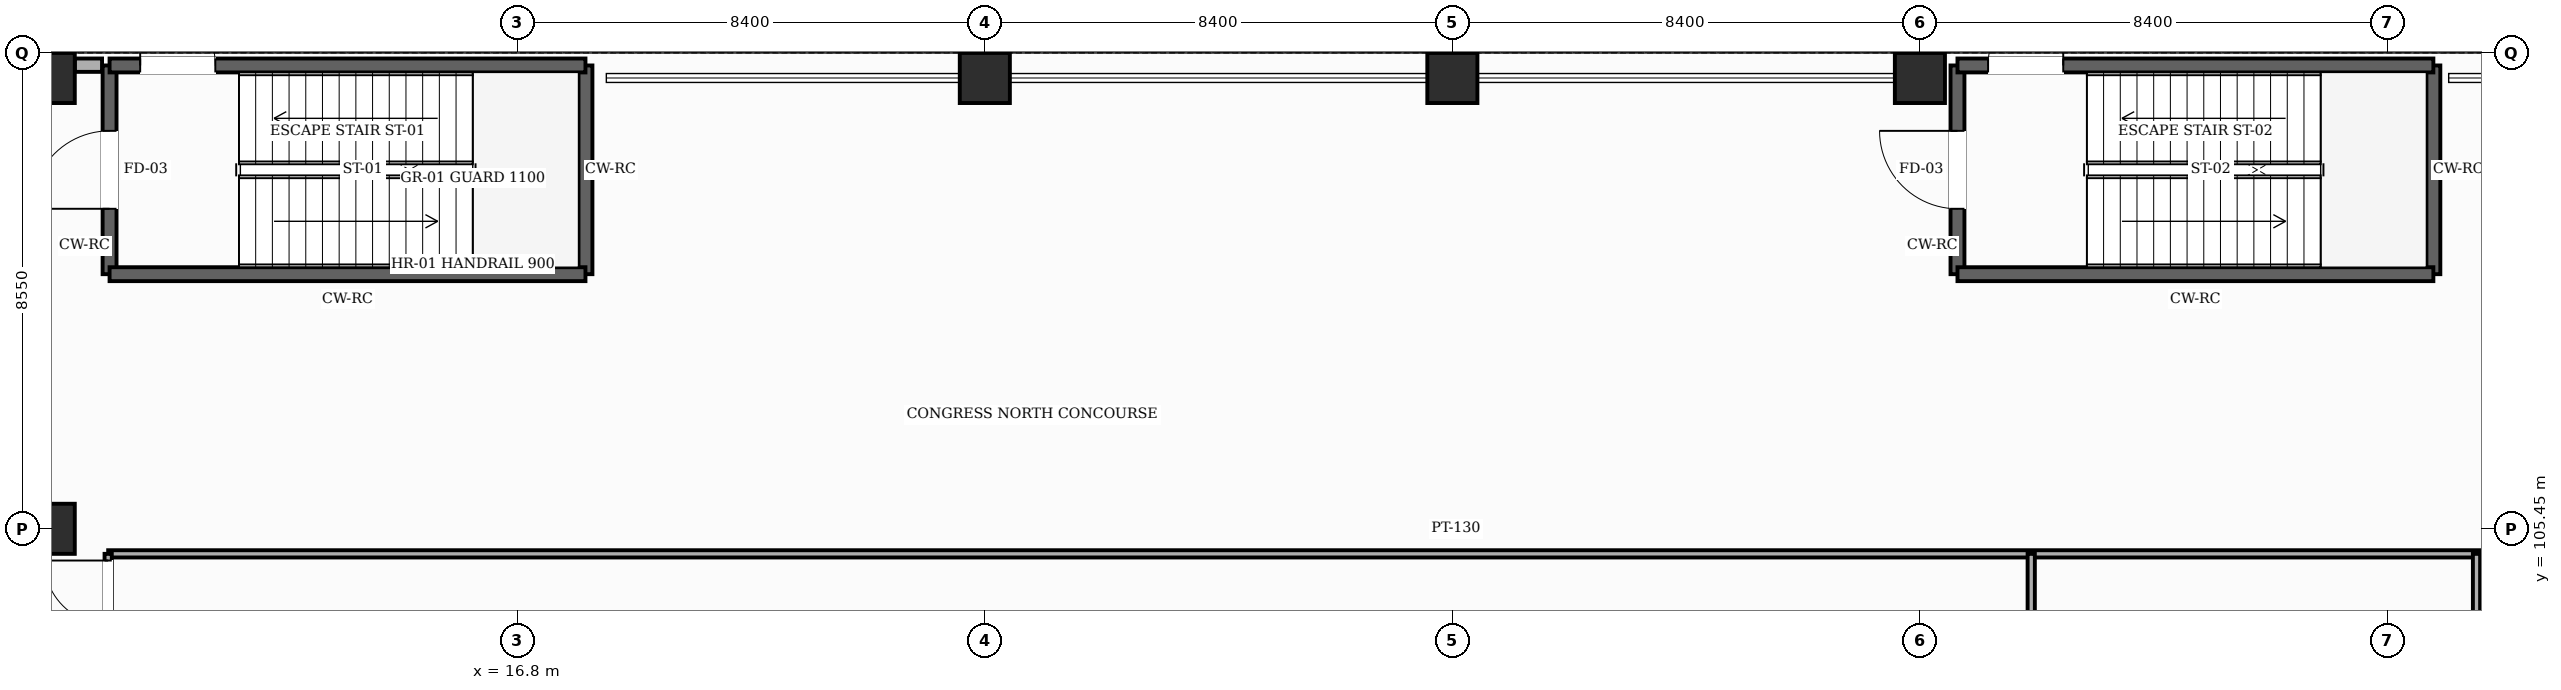
"""IFC4 building model, lengths in metres.
Left out: names, types, materials, properties, quantities, classifications, styles, units other than length and angle.
Written with IfcOpenShell. Run it as: python <this file> out.ifc"""

import sys

from ifc_helpers import new_model, si_unit, direction, frame, frame_2d, origin, origin_2d, place, context, subcontext, project, spatial, rectangle, hollow_rectangle, extrude, element, fill, save


model = new_model("IFC4")
c1 = context("Model", 3, precision=1e-05, world=origin(), true_north=direction((0.0, 1.0)))
c2 = subcontext(c1, "Body", "Model", "MODEL_VIEW")
j1 = project(units=[si_unit("LENGTHUNIT", "METRE"), si_unit("PLANEANGLEUNIT", "RADIAN")], contexts=[c1])
p1 = place(None, origin())
s1 = spatial("IfcSite", under=j1, at=p1, CompositionType="ELEMENT")
p2 = place(p1, origin())
s2 = spatial("IfcBuilding", under=s1, at=p2, CompositionType="ELEMENT")
p3 = place(p2, origin())
s3 = spatial("IfcBuildingStorey", under=s2, at=p3, CompositionType="ELEMENT", Elevation=0.0)
for number, where, z_axis, x_axis in (
    (1, (8.4, 105.45, 0.0), (0.0, 0.0, 1.0), (1.0, 0.0, 0.0)),
    (2, (8.4, 113.55, 0.0), (0.0, 0.0, 1.0), (1.0, 0.0, 0.0)),
    (3, (25.2, 113.55, 0.0), (0.0, 0.0, 1.0), (1.0, 0.0, 0.0)),
    (4, (33.6, 113.55, 0.0), (0.0, 0.0, 1.0), (1.0, 0.0, 0.0)),
    (5, (42.0, 113.55, 0.0), (0.0, 0.0, 1.0), (1.0, 0.0, 0.0)),
):
    element("IfcColumn", number, at=place(p3, frame(where, z_axis=z_axis, x_axis=x_axis)), inside=s3, PredefinedType="COLUMN", context=c2, shape_type="SweptSolid", body=[
        extrude(hollow_rectangle(XDim=0.9, YDim=0.9, WallThickness=0.032, InnerFilletRadius=0.032, OuterFilletRadius=0.064, at=origin_2d()), origin(), (0.0, 0.0, 1.0), 5.4),
    ])
p4 = place(p3, frame((8.85, 113.78, 0.0), z_axis=(0.0, 0.0, 1.0), x_axis=(1.0, 0.0, 0.0)))
e6 = element("IfcWall", 6, at=p4, inside=s3, PredefinedType="SOLIDWALL", context=c2, shape_type="SweptSolid", body=[
    extrude(rectangle(XDim=0.49, YDim=0.24, at=frame_2d((0.245, 0.0))), origin(), (0.0, 0.0, 1.0), 5.135),
])
p5 = place(p3, frame((9.475, 110.025, 0.0), z_axis=(0.0, 0.0, 1.0), x_axis=(0.0, 1.0, 0.0)))
e7 = element("IfcWall", 7, at=p5, inside=s3, PredefinedType="SHEAR", context=c2, shape_type="SweptSolid", body=[
    extrude(rectangle(XDim=3.75, YDim=0.25, at=frame_2d((1.875, 0.0))), origin(), (0.0, 0.0, 1.0), 5.15),
])
p6 = place(p5, frame((1.175, 0.0, 0.0)))
e8 = element("IfcOpeningElement", 8, at=p6, cuts=e7, PredefinedType="OPENING", context=c2, shape_type="SweptSolid", body=[
    extrude(rectangle(XDim=1.4, YDim=2.25, at=frame_2d((0.7, 1.125))), frame((0.0, 0.135, 0.0), z_axis=(0.0, -1.0, 0.0), x_axis=(1.0, 0.0, 0.0)), (0.0, 0.0, 1.0), 0.27),
])
p7 = place(p3, frame((18.025, 113.775, 0.0), z_axis=(0.0, 0.0, 1.0), x_axis=(0.0, -1.0, 0.0)))
e9 = element("IfcWall", 9, at=p7, inside=s3, PredefinedType="SHEAR", context=c2, shape_type="SweptSolid", body=[
    extrude(rectangle(XDim=3.75, YDim=0.25, at=frame_2d((1.875, 0.0))), origin(), (0.0, 0.0, 1.0), 5.15),
])
p8 = place(p3, frame((18.025, 110.025, 0.0), z_axis=(0.0, 0.0, 1.0), x_axis=(-1.0, 0.0, 0.0)))
e10 = element("IfcWall", 10, at=p8, inside=s3, PredefinedType="SHEAR", context=c2, shape_type="SweptSolid", body=[
    extrude(rectangle(XDim=8.55, YDim=0.25, at=frame_2d((4.275, 0.0))), origin(), (0.0, 0.0, 1.0), 5.15),
])
p9 = place(p3, frame((9.475, 113.775, 0.0), z_axis=(0.0, 0.0, 1.0), x_axis=(1.0, 0.0, 0.0)))
e11 = element("IfcWall", 11, at=p9, inside=s3, PredefinedType="SHEAR", context=c2, shape_type="SweptSolid", body=[
    extrude(rectangle(XDim=8.55, YDim=0.25, at=frame_2d((4.275, 0.0))), origin(), (0.0, 0.0, 1.0), 5.15),
])
p10 = place(p9, frame((0.55, 0.0, 0.0)))
e12 = element("IfcOpeningElement", 12, at=p10, cuts=e11, PredefinedType="OPENING", context=c2, shape_type="SweptSolid", body=[
    extrude(rectangle(XDim=1.35, YDim=2.3, at=frame_2d((0.675, 1.15))), frame((0.0, 0.135, 0.0), z_axis=(0.0, -1.0, 0.0), x_axis=(1.0, 0.0, 0.0)), (0.0, 0.0, 1.0), 0.27),
])
p11 = place(p3, frame((42.675, 110.025, 0.0), z_axis=(0.0, 0.0, 1.0), x_axis=(0.0, 1.0, 0.0)))
e13 = element("IfcWall", 13, at=p11, inside=s3, PredefinedType="SHEAR", context=c2, shape_type="SweptSolid", body=[
    extrude(rectangle(XDim=3.75, YDim=0.25, at=frame_2d((1.875, 0.0))), origin(), (0.0, 0.0, 1.0), 5.15),
])
p12 = place(p11, frame((1.175, 0.0, 0.0)))
e14 = element("IfcOpeningElement", 14, at=p12, cuts=e13, PredefinedType="OPENING", context=c2, shape_type="SweptSolid", body=[
    extrude(rectangle(XDim=1.4, YDim=2.25, at=frame_2d((0.7, 1.125))), frame((0.0, 0.135, 0.0), z_axis=(0.0, -1.0, 0.0), x_axis=(1.0, 0.0, 0.0)), (0.0, 0.0, 1.0), 0.27),
])
p13 = place(p3, frame((51.225, 113.775, 0.0), z_axis=(0.0, 0.0, 1.0), x_axis=(0.0, -1.0, 0.0)))
e15 = element("IfcWall", 15, at=p13, inside=s3, PredefinedType="SHEAR", context=c2, shape_type="SweptSolid", body=[
    extrude(rectangle(XDim=3.75, YDim=0.25, at=frame_2d((1.875, 0.0))), origin(), (0.0, 0.0, 1.0), 5.15),
])
p14 = place(p3, frame((51.225, 110.025, 0.0), z_axis=(0.0, 0.0, 1.0), x_axis=(-1.0, 0.0, 0.0)))
e16 = element("IfcWall", 16, at=p14, inside=s3, PredefinedType="SHEAR", context=c2, shape_type="SweptSolid", body=[
    extrude(rectangle(XDim=8.55, YDim=0.25, at=frame_2d((4.275, 0.0))), origin(), (0.0, 0.0, 1.0), 5.15),
])
p15 = place(p3, frame((42.675, 113.775, 0.0), z_axis=(0.0, 0.0, 1.0), x_axis=(1.0, 0.0, 0.0)))
e17 = element("IfcWall", 17, at=p15, inside=s3, PredefinedType="SHEAR", context=c2, shape_type="SweptSolid", body=[
    extrude(rectangle(XDim=8.55, YDim=0.25, at=frame_2d((4.275, 0.0))), origin(), (0.0, 0.0, 1.0), 5.15),
])
p16 = place(p15, frame((0.55, 0.0, 0.0)))
e18 = element("IfcOpeningElement", 18, at=p16, cuts=e17, PredefinedType="OPENING", context=c2, shape_type="SweptSolid", body=[
    extrude(rectangle(XDim=1.35, YDim=2.3, at=frame_2d((0.675, 1.15))), frame((0.0, 0.135, 0.0), z_axis=(0.0, -1.0, 0.0), x_axis=(1.0, 0.0, 0.0)), (0.0, 0.0, 1.0), 0.27),
])
p17 = place(p3, frame((9.45, 105.0, 0.0), z_axis=(0.0, 0.0, 1.0), x_axis=(1.0, 0.0, 0.0)))
e19 = element("IfcWall", 19, at=p17, inside=s3, PredefinedType="PARTITIONING", context=c2, shape_type="SweptSolid", body=[
    extrude(rectangle(XDim=48.43, YDim=0.13, at=frame_2d((24.215, 0.0))), origin(), (0.0, 0.0, 1.0), 5.135),
])
p18 = place(p3, frame((9.45, 56.0, 0.0), z_axis=(0.0, 0.0, 1.0), x_axis=(0.0, 1.0, 0.0)))
e20 = element("IfcWall", 20, at=p18, inside=s3, PredefinedType="PARTITIONING", context=c2, shape_type="SweptSolid", body=[
    extrude(rectangle(XDim=49.0, YDim=0.13, at=frame_2d((24.5, 0.0))), origin(), (0.0, 0.0, 1.0), 5.135),
])
p19 = place(p18, frame((46.58, 0.0, 0.0)))
e21 = element("IfcOpeningElement", 21, at=p19, cuts=e20, PredefinedType="OPENING", context=c2, shape_type="SweptSolid", body=[
    extrude(rectangle(XDim=2.3, YDim=2.55, at=frame_2d((1.15, 1.275))), frame((0.0, 0.075, 0.0), z_axis=(0.0, -1.0, 0.0), x_axis=(1.0, 0.0, 0.0)), (0.0, 0.0, 1.0), 0.15),
])
p20 = place(p3, frame((44.0, 56.0, 0.0), z_axis=(0.0, 0.0, 1.0), x_axis=(0.0, 1.0, 0.0)))
e22 = element("IfcWall", 22, at=p20, inside=s3, PredefinedType="PARTITIONING", context=c2, shape_type="SweptSolid", body=[
    extrude(rectangle(XDim=49.0, YDim=0.13, at=frame_2d((24.5, 0.0))), origin(), (0.0, 0.0, 1.0), 5.135),
])
p21 = place(p3, frame((52.0, 56.0, 0.0), z_axis=(0.0, 0.0, 1.0), x_axis=(0.0, 1.0, 0.0)))
e23 = element("IfcWall", 23, at=p21, inside=s3, PredefinedType="PARTITIONING", context=c2, shape_type="SweptSolid", body=[
    extrude(rectangle(XDim=49.0, YDim=0.13, at=frame_2d((24.5, 0.0))), origin(), (0.0, 0.0, 1.0), 5.135),
])
p22 = place(p21, frame((23.8, 0.0, 0.0)))
e24 = element("IfcOpeningElement", 24, at=p22, cuts=e23, PredefinedType="OPENING", context=c2, shape_type="SweptSolid", body=[
    extrude(rectangle(XDim=1.4, YDim=2.25, at=frame_2d((0.7, 1.125))), frame((0.0, 0.075, 0.0), z_axis=(0.0, -1.0, 0.0), x_axis=(1.0, 0.0, 0.0)), (0.0, 0.0, 1.0), 0.15),
])
p23 = place(p6, origin())
e25 = element("IfcDoor", 25, at=p23, inside=s3, OperationType="SINGLE_SWING_LEFT", PredefinedType="DOOR", context=c2, shape_type="SweptSolid", body=[
    extrude(rectangle(XDim=1.4, YDim=2.25, at=frame_2d((0.7, 1.125))), frame((0.0, 0.025, 0.0), z_axis=(0.0, -1.0, 0.0), x_axis=(1.0, 0.0, 0.0)), (0.0, 0.0, 1.0), 0.05),
])
fill(e8, e25)
p24 = place(p10, origin())
e26 = element("IfcDoor", 26, at=p24, inside=s3, OperationType="SINGLE_SWING_LEFT", PredefinedType="DOOR", context=c2, shape_type="SweptSolid", body=[
    extrude(rectangle(XDim=1.35, YDim=2.3, at=frame_2d((0.675, 1.15))), frame((0.0, 0.025, 0.0), z_axis=(0.0, -1.0, 0.0), x_axis=(1.0, 0.0, 0.0)), (0.0, 0.0, 1.0), 0.05),
])
fill(e12, e26)
p25 = place(p12, origin())
e27 = element("IfcDoor", 27, at=p25, inside=s3, OperationType="SINGLE_SWING_RIGHT", PredefinedType="DOOR", context=c2, shape_type="SweptSolid", body=[
    extrude(rectangle(XDim=1.4, YDim=2.25, at=frame_2d((0.7, 1.125))), frame((0.0, 0.025, 0.0), z_axis=(0.0, -1.0, 0.0), x_axis=(1.0, 0.0, 0.0)), (0.0, 0.0, 1.0), 0.05),
])
fill(e14, e27)
p26 = place(p16, origin())
e28 = element("IfcDoor", 28, at=p26, inside=s3, OperationType="SINGLE_SWING_RIGHT", PredefinedType="DOOR", context=c2, shape_type="SweptSolid", body=[
    extrude(rectangle(XDim=1.35, YDim=2.3, at=frame_2d((0.675, 1.15))), frame((0.0, 0.025, 0.0), z_axis=(0.0, -1.0, 0.0), x_axis=(1.0, 0.0, 0.0)), (0.0, 0.0, 1.0), 0.05),
])
fill(e18, e28)
p27 = place(p19, origin())
e29 = element("IfcDoor", 29, at=p27, inside=s3, OperationType="DOUBLE_DOOR_SINGLE_SWING", PredefinedType="DOOR", context=c2, shape_type="SweptSolid", body=[
    extrude(rectangle(XDim=2.3, YDim=2.55, at=frame_2d((1.15, 1.275))), frame((0.0, 0.025, 0.0), z_axis=(0.0, -1.0, 0.0), x_axis=(1.0, 0.0, 0.0)), (0.0, 0.0, 1.0), 0.05),
])
fill(e21, e29)
save(model, sys.argv[1])
